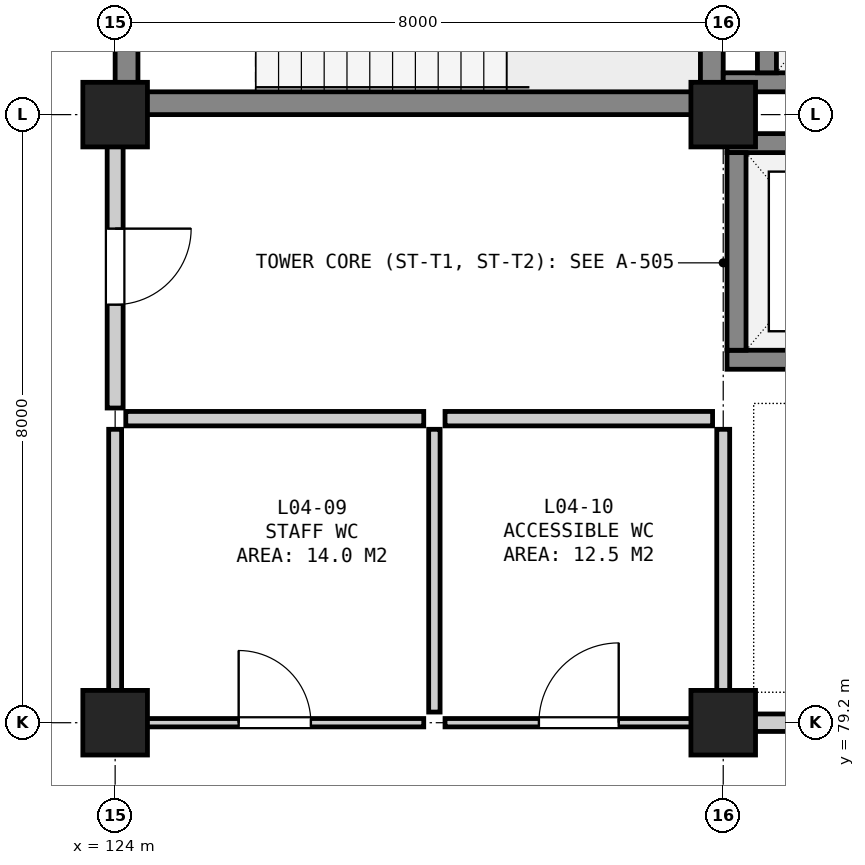
"""IFC4 building model, lengths in metres.
Left out: names, types, materials, properties, quantities, classifications, styles, units other than length and angle.
Written with IfcOpenShell. Run it as: python <this file> out.ifc"""

import sys

from ifc_helpers import new_model, si_unit, direction, frame, frame_2d, origin, origin_2d, place, context, subcontext, project, spatial, rectangle, extrude, element, fill, save


model = new_model("IFC4")
c1 = context("Model", 3, precision=1e-05, world=origin(), true_north=direction((0.0, 1.0)))
c2 = subcontext(c1, "Body", "Model", "MODEL_VIEW")
j1 = project(units=[si_unit("LENGTHUNIT", "METRE"), si_unit("PLANEANGLEUNIT", "RADIAN")], contexts=[c1])
p1 = place(None, origin())
s1 = spatial("IfcSite", under=j1, at=p1, CompositionType="ELEMENT")
p2 = place(p1, origin())
s2 = spatial("IfcBuilding", under=s1, at=p2, CompositionType="ELEMENT")
p3 = place(p2, frame((0.0, 0.0, 19.8)))
s3 = spatial("IfcBuildingStorey", under=s2, at=p3, CompositionType="ELEMENT", Elevation=19.8)
for number, where, z_axis, x_axis in (
    (1, (124.0, 79.2, 0.0), (0.0, 0.0, 1.0), (1.0, 0.0, 0.0)),
    (2, (124.0, 87.2, 0.0), (0.0, 0.0, 1.0), (1.0, 0.0, 0.0)),
    (3, (132.0, 79.2, 0.0), (0.0, 0.0, 1.0), (1.0, 0.0, 0.0)),
    (4, (132.0, 87.2, 0.0), (0.0, 0.0, 1.0), (1.0, 0.0, 0.0)),
):
    element("IfcColumn", number, at=place(p3, frame(where, z_axis=z_axis, x_axis=x_axis)), inside=s3, PredefinedType="COLUMN", context=c2, shape_type="SweptSolid", body=[
        extrude(rectangle(XDim=0.85, YDim=0.85, at=origin_2d()), origin(), (0.0, 0.0, 1.0), 4.0),
    ])
for number, where, z_axis, x_axis in (
    (5, (124.15, 87.2, 0.0), (0.0, 0.0, 1.0), (0.0, 1.0, 0.0)),
    (6, (131.85, 87.2, 0.0), (0.0, 0.0, 1.0), (0.0, 1.0, 0.0)),
):
    element("IfcWall", number, at=place(p3, frame(where, z_axis=z_axis, x_axis=x_axis)), inside=s3, PredefinedType="SHEAR", context=c2, shape_type="SweptSolid", body=[
        extrude(rectangle(XDim=4.2, YDim=0.3, at=frame_2d((2.1, 0.0))), origin(), (0.0, 0.0, 1.0), 3.72),
    ])
p4 = place(p3, frame((124.3, 87.35, 0.0), z_axis=(0.0, 0.0, 1.0), x_axis=(1.0, 0.0, 0.0)))
e7 = element("IfcWall", 7, at=p4, inside=s3, PredefinedType="SHEAR", context=c2, shape_type="SweptSolid", body=[
    extrude(rectangle(XDim=7.4, YDim=0.3, at=frame_2d((3.7, 0.0))), origin(), (0.0, 0.0, 1.0), 3.72),
])
p5 = place(p3, frame((132.0, 87.625, 0.0), z_axis=(0.0, 0.0, 1.0), x_axis=(1.0, 0.0, 0.0)))
e8 = element("IfcWall", 8, at=p5, inside=s3, PredefinedType="SHEAR", context=c2, shape_type="SweptSolid", body=[
    extrude(rectangle(XDim=3.15, YDim=0.25, at=frame_2d((1.575, 0.0))), origin(), (0.0, 0.0, 1.0), 3.72),
])
p6 = place(p3, frame((132.575, 87.75, 0.0), z_axis=(0.0, 0.0, 1.0), x_axis=(0.0, 1.0, 0.0)))
e9 = element("IfcWall", 9, at=p6, inside=s3, PredefinedType="SHEAR", context=c2, shape_type="SweptSolid", body=[
    extrude(rectangle(XDim=2.9, YDim=0.25, at=frame_2d((1.45, 0.0))), origin(), (0.0, 0.0, 1.0), 3.72),
])
p7 = place(p3, frame((132.05, 83.975, 0.0), z_axis=(0.0, 0.0, 1.0), x_axis=(1.0, 0.0, 0.0)))
e10 = element("IfcWall", 10, at=p7, inside=s3, PredefinedType="SHEAR", context=c2, shape_type="SweptSolid", body=[
    extrude(rectangle(XDim=2.7, YDim=0.25, at=frame_2d((1.35, 0.0))), origin(), (0.0, 0.0, 1.0), 3.72),
])
p8 = place(p7, frame((0.8, 0.0, 0.0)))
e11 = element("IfcOpeningElement", 11, at=p8, cuts=e10, PredefinedType="OPENING", context=c2, shape_type="SweptSolid", body=[
    extrude(rectangle(XDim=1.1, YDim=2.15, at=frame_2d((0.55, 1.075))), frame((0.0, 0.137, 0.0), z_axis=(0.0, -1.0, 0.0), x_axis=(1.0, 0.0, 0.0)), (0.0, 0.0, 1.0), 0.274),
])
p9 = place(p3, frame((132.05, 86.825, 0.0), z_axis=(0.0, 0.0, 1.0), x_axis=(1.0, 0.0, 0.0)))
e12 = element("IfcWall", 12, at=p9, inside=s3, PredefinedType="SHEAR", context=c2, shape_type="SweptSolid", body=[
    extrude(rectangle(XDim=2.7, YDim=0.25, at=frame_2d((1.35, 0.0))), origin(), (0.0, 0.0, 1.0), 3.72),
])
p10 = place(p3, frame((132.175, 84.1, 0.0), z_axis=(0.0, 0.0, 1.0), x_axis=(0.0, 1.0, 0.0)))
e13 = element("IfcWall", 13, at=p10, inside=s3, PredefinedType="SHEAR", context=c2, shape_type="SweptSolid", body=[
    extrude(rectangle(XDim=2.6, YDim=0.25, at=frame_2d((1.3, 0.0))), origin(), (0.0, 0.0, 1.0), 3.72),
])
p11 = place(p3, frame((124.14, 79.2, 0.0), z_axis=(0.0, 0.0, 1.0), x_axis=(1.0, 0.0, 0.0)))
e14 = element("IfcWall", 14, at=p11, inside=s3, PredefinedType="PARTITIONING", context=c2, shape_type="SweptSolid", body=[
    extrude(rectangle(XDim=3.92, YDim=0.11, at=frame_2d((1.96, 0.0))), origin(), (0.0, 0.0, 1.0), 2.995),
])
p12 = place(p11, frame((1.485, 0.0, 0.0)))
e15 = element("IfcOpeningElement", 15, at=p12, cuts=e14, PredefinedType="OPENING", context=c2, shape_type="SweptSolid", body=[
    extrude(rectangle(XDim=0.95, YDim=2.15, at=frame_2d((0.475, 1.075))), frame((0.0, 0.067, 0.0), z_axis=(0.0, -1.0, 0.0), x_axis=(1.0, 0.0, 0.0)), (0.0, 0.0, 1.0), 0.134),
])
p13 = place(p3, frame((124.14, 83.2, 0.0), z_axis=(0.0, 0.0, 1.0), x_axis=(1.0, 0.0, 0.0)))
e16 = element("IfcWall", 16, at=p13, inside=s3, PredefinedType="PARTITIONING", context=c2, shape_type="SweptSolid", body=[
    extrude(rectangle(XDim=3.92, YDim=0.19, at=frame_2d((1.96, 0.0))), origin(), (0.0, 0.0, 1.0), 3.72),
])
p14 = place(p3, frame((124.0, 79.34, 0.0), z_axis=(0.0, 0.0, 1.0), x_axis=(0.0, 1.0, 0.0)))
e17 = element("IfcWall", 17, at=p14, inside=s3, PredefinedType="PARTITIONING", context=c2, shape_type="SweptSolid", body=[
    extrude(rectangle(XDim=3.72, YDim=0.17, at=frame_2d((1.86, 0.0))), origin(), (0.0, 0.0, 1.0), 3.245),
])
p15 = place(p3, frame((128.2, 79.34, 0.0), z_axis=(0.0, 0.0, 1.0), x_axis=(0.0, 1.0, 0.0)))
e18 = element("IfcWall", 18, at=p15, inside=s3, PredefinedType="PARTITIONING", context=c2, shape_type="SweptSolid", body=[
    extrude(rectangle(XDim=3.72, YDim=0.15, at=frame_2d((1.86, 0.0))), origin(), (0.0, 0.0, 1.0), 3.72),
])
p16 = place(p3, frame((128.34, 79.2, 0.0), z_axis=(0.0, 0.0, 1.0), x_axis=(1.0, 0.0, 0.0)))
e19 = element("IfcWall", 19, at=p16, inside=s3, PredefinedType="PARTITIONING", context=c2, shape_type="SweptSolid", body=[
    extrude(rectangle(XDim=3.52, YDim=0.11, at=frame_2d((1.76, 0.0))), origin(), (0.0, 0.0, 1.0), 2.995),
])
p17 = place(p16, frame((1.235, 0.0, 0.0)))
e20 = element("IfcOpeningElement", 20, at=p17, cuts=e19, PredefinedType="OPENING", context=c2, shape_type="SweptSolid", body=[
    extrude(rectangle(XDim=1.05, YDim=2.15, at=frame_2d((0.525, 1.075))), frame((0.0, 0.067, 0.0), z_axis=(0.0, -1.0, 0.0), x_axis=(1.0, 0.0, 0.0)), (0.0, 0.0, 1.0), 0.134),
])
p18 = place(p3, frame((128.34, 83.2, 0.0), z_axis=(0.0, 0.0, 1.0), x_axis=(1.0, 0.0, 0.0)))
e21 = element("IfcWall", 21, at=p18, inside=s3, PredefinedType="PARTITIONING", context=c2, shape_type="SweptSolid", body=[
    extrude(rectangle(XDim=3.52, YDim=0.19, at=frame_2d((1.76, 0.0))), origin(), (0.0, 0.0, 1.0), 3.72),
])
p19 = place(p3, frame((132.0, 79.34, 0.0), z_axis=(0.0, 0.0, 1.0), x_axis=(0.0, 1.0, 0.0)))
e22 = element("IfcWall", 22, at=p19, inside=s3, PredefinedType="PARTITIONING", context=c2, shape_type="SweptSolid", body=[
    extrude(rectangle(XDim=3.72, YDim=0.17, at=frame_2d((1.86, 0.0))), origin(), (0.0, 0.0, 1.0), 3.095),
])
p20 = place(p3, frame((124.0, 83.34, 0.0), z_axis=(0.0, 0.0, 1.0), x_axis=(0.0, 1.0, 0.0)))
e23 = element("IfcWall", 23, at=p20, inside=s3, PredefinedType="SOLIDWALL", context=c2, shape_type="SweptSolid", body=[
    extrude(rectangle(XDim=3.72, YDim=0.21, at=frame_2d((1.86, 0.0))), origin(), (0.0, 0.0, 1.0), 3.245),
])
p21 = place(p20, frame((1.36, 0.0, 0.0)))
e24 = element("IfcOpeningElement", 24, at=p21, cuts=e23, PredefinedType="OPENING", context=c2, shape_type="SweptSolid", body=[
    extrude(rectangle(XDim=1.0, YDim=2.15, at=frame_2d((0.5, 1.075))), frame((0.0, 0.117, 0.0), z_axis=(0.0, -1.0, 0.0), x_axis=(1.0, 0.0, 0.0)), (0.0, 0.0, 1.0), 0.234),
])
p22 = place(p3, frame((132.14, 79.2, 0.0), z_axis=(0.0, 0.0, 1.0), x_axis=(1.0, 0.0, 0.0)))
e25 = element("IfcWall", 25, at=p22, inside=s3, PredefinedType="SOLIDWALL", context=c2, shape_type="SweptSolid", body=[
    extrude(rectangle(XDim=7.72, YDim=0.23, at=frame_2d((3.86, 0.0))), origin(), (0.0, 0.0, 1.0), 3.045),
])
p23 = place(p22, frame((3.11, 0.0, 0.0)))
e26 = element("IfcOpeningElement", 26, at=p23, cuts=e25, PredefinedType="OPENING", context=c2, shape_type="SweptSolid", body=[
    extrude(rectangle(XDim=1.5, YDim=2.2, at=frame_2d((0.75, 1.1))), frame((0.0, 0.127, 0.0), z_axis=(0.0, -1.0, 0.0), x_axis=(1.0, 0.0, 0.0)), (0.0, 0.0, 1.0), 0.254),
])
p24 = place(p12, origin())
e27 = element("IfcDoor", 27, at=p24, inside=s3, OperationType="SINGLE_SWING_LEFT", PredefinedType="DOOR", context=c2, shape_type="SweptSolid", body=[
    extrude(rectangle(XDim=0.95, YDim=2.15, at=frame_2d((0.475, 1.075))), frame((0.0, 0.025, 0.0), z_axis=(0.0, -1.0, 0.0), x_axis=(1.0, 0.0, 0.0)), (0.0, 0.0, 1.0), 0.05),
])
fill(e15, e27)
p25 = place(p17, origin())
e28 = element("IfcDoor", 28, at=p25, inside=s3, OperationType="SINGLE_SWING_RIGHT", PredefinedType="DOOR", context=c2, shape_type="SweptSolid", body=[
    extrude(rectangle(XDim=1.05, YDim=2.15, at=frame_2d((0.525, 1.075))), frame((0.0, 0.025, 0.0), z_axis=(0.0, -1.0, 0.0), x_axis=(1.0, 0.0, 0.0)), (0.0, 0.0, 1.0), 0.05),
])
fill(e20, e28)
p26 = place(p21, frame((1.0, 0.0, 0.0), z_axis=(0.0, 0.0, 1.0), x_axis=(-1.0, 0.0, 0.0)))
e29 = element("IfcDoor", 29, at=p26, inside=s3, OperationType="SINGLE_SWING_LEFT", PredefinedType="DOOR", context=c2, shape_type="SweptSolid", body=[
    extrude(rectangle(XDim=1.0, YDim=2.15, at=frame_2d((0.5, 1.075))), frame((0.0, 0.025, 0.0), z_axis=(0.0, -1.0, 0.0), x_axis=(1.0, 0.0, 0.0)), (0.0, 0.0, 1.0), 0.05),
])
fill(e24, e29)
save(model, sys.argv[1])
